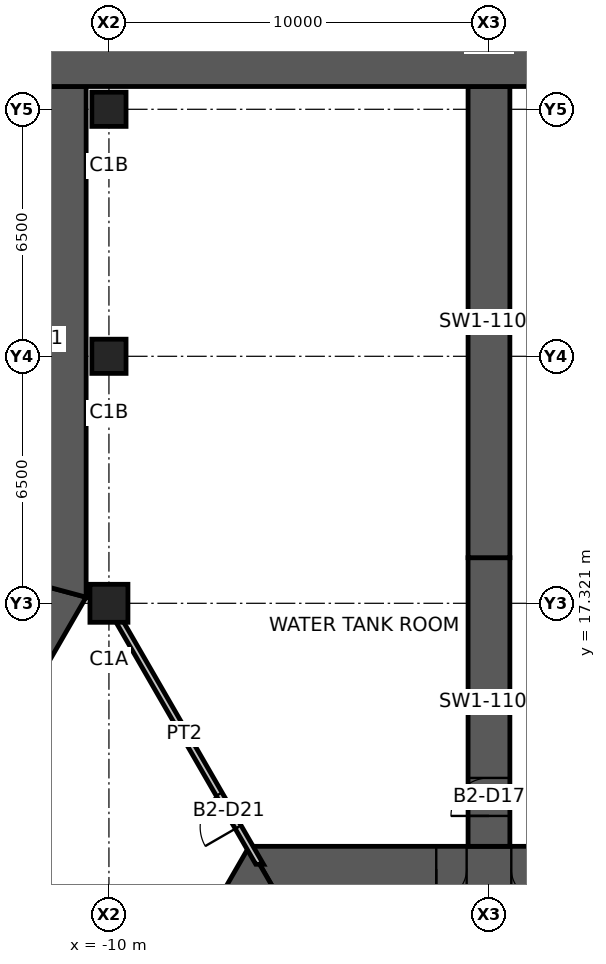
"""IFC4 building model, lengths in metres.
Left out: names, types, materials, properties, quantities, classifications, styles, units other than length and angle.
Written with IfcOpenShell. Run it as: python <this file> out.ifc"""

import sys

from ifc_helpers import new_model, si_unit, direction, frame, frame_2d, origin, origin_2d, place, context, subcontext, project, spatial, polyline, rectangle, hollow_rectangle, outline, extrude, element, fill, save


model = new_model("IFC4")
c1 = context("Model", 3, precision=1e-05, world=origin(), true_north=direction((0.0, 1.0)))
c2 = subcontext(c1, "Body", "Model", "MODEL_VIEW")
j1 = project(units=[si_unit("LENGTHUNIT", "METRE"), si_unit("PLANEANGLEUNIT", "RADIAN")], contexts=[c1])
p1 = place(None, origin())
s1 = spatial("IfcSite", under=j1, at=p1, CompositionType="ELEMENT")
p2 = place(p1, origin())
s2 = spatial("IfcBuilding", under=s1, at=p2, CompositionType="ELEMENT")
p3 = place(p2, frame((0.0, 0.0, -10.0)))
s3 = spatial("IfcBuildingStorey", under=s2, at=p3, CompositionType="ELEMENT", Elevation=-10.0)
p4 = place(p3, frame((-10.0, 17.321, -1.2), z_axis=(0.0, 0.0, 1.0), x_axis=(1.0, 0.0, 0.0)))
e1 = element("IfcColumn", 1, at=p4, inside=s3, PredefinedType="COLUMN", context=c2, shape_type="SweptSolid", body=[
    extrude(hollow_rectangle(XDim=1.0, YDim=1.0, WallThickness=0.06, at=origin_2d()), origin(), (0.0, 0.0, 1.0), 6.2),
])
for number, where, z_axis, x_axis in (
    (2, (-10.0, 23.821, -1.2), (0.0, 0.0, 1.0), (1.0, 0.0, 0.0)),
    (3, (-10.0, 30.321, -1.2), (0.0, 0.0, 1.0), (1.0, 0.0, 0.0)),
):
    element("IfcColumn", number, at=place(p3, frame(where, z_axis=z_axis, x_axis=x_axis)), inside=s3, PredefinedType="COLUMN", context=c2, shape_type="SweptSolid", body=[
        extrude(hollow_rectangle(XDim=0.9, YDim=0.9, WallThickness=0.05, at=origin_2d()), origin(), (0.0, 0.0, 1.0), 6.2),
    ])
p5 = place(p3, frame((5.961, 10.325, 0.0), z_axis=(0.0, 0.0, 1.0), x_axis=(-1.0, 0.0, 0.0)))
e4 = element("IfcWall", 4, at=p5, inside=s3, PredefinedType="SHEAR", context=c2, shape_type="SweptSolid", body=[
    extrude(outline(polyline([(-0.346, -0.6), (4.574, -0.6), (5.374, -0.6), (6.549, -0.6), (7.349, -0.6), (12.269, -0.6), (11.576, 0.6), (7.349, 0.6), (6.549, 0.6), (5.374, 0.6), (4.574, 0.6), (0.346, 0.6), (-0.346, -0.6)])), origin(), (0.0, 0.0, 1.0), 5.0),
])
p6 = place(p5, frame((6.549, 0.0, 0.0)))
e5 = element("IfcOpeningElement", 5, at=p6, cuts=e4, PredefinedType="OPENING", context=c2, shape_type="SweptSolid", body=[
    extrude(rectangle(XDim=0.8, YDim=2.1, at=frame_2d((0.4, 1.05))), frame((0.0, 0.61, 0.0), z_axis=(0.0, -1.0, 0.0), x_axis=(1.0, 0.0, 0.0)), (0.0, 0.0, 1.0), 1.22),
])
p7 = place(p5, frame((4.574, 0.0, 0.0)))
e6 = element("IfcOpeningElement", 6, at=p7, cuts=e4, PredefinedType="OPENING", context=c2, shape_type="SweptSolid", body=[
    extrude(rectangle(XDim=0.8, YDim=2.1, at=frame_2d((0.4, 1.05))), frame((0.0, 0.61, 0.0), z_axis=(0.0, -1.0, 0.0), x_axis=(1.0, 0.0, 0.0)), (0.0, 0.0, 1.0), 1.22),
])
p8 = place(p3, frame((-5.961, 10.325, 0.0), z_axis=(0.0, 0.0, 1.0), x_axis=(-0.500004296715, -0.866022923061, 0.0)))
e7 = element("IfcWall", 7, at=p8, inside=s3, PredefinedType="SHEAR", context=c2, shape_type="SweptSolid", body=[
    extrude(outline(polyline([(-0.346, -0.6), (4.494, -0.6), (5.494, -0.6), (12.269, -0.6), (11.576, 0.6), (5.494, 0.6), (4.494, 0.6), (0.346, 0.6), (-0.346, -0.6)])), origin(), (0.0, 0.0, 1.0), 5.0),
])
p9 = place(p8, frame((4.494, 0.0, 0.0)))
e8 = element("IfcOpeningElement", 8, at=p9, cuts=e7, PredefinedType="OPENING", context=c2, shape_type="SweptSolid", body=[
    extrude(rectangle(XDim=1.0, YDim=2.1, at=frame_2d((0.5, 1.05))), frame((0.0, 0.61, 0.0), z_axis=(0.0, -1.0, 0.0), x_axis=(1.0, 0.0, 0.0)), (0.0, 0.0, 1.0), 1.22),
])
p10 = place(p3, frame((0.0, 10.925, 0.0), z_axis=(0.0, 0.0, 1.0), x_axis=(0.0, 1.0, 0.0)))
e9 = element("IfcWall", 9, at=p10, inside=s3, PredefinedType="SHEAR", context=c2, shape_type="SweptSolid", body=[
    extrude(rectangle(XDim=7.595, YDim=1.1, at=frame_2d((3.798, 0.0))), origin(), (0.0, 0.0, 1.0), 5.0),
])
p11 = place(p10, frame((0.8, 0.0, 0.0)))
e10 = element("IfcOpeningElement", 10, at=p11, cuts=e9, PredefinedType="OPENING", context=c2, shape_type="SweptSolid", body=[
    extrude(rectangle(XDim=1.0, YDim=2.1, at=frame_2d((0.5, 1.05))), frame((0.0, 0.56, 0.0), z_axis=(0.0, -1.0, 0.0), x_axis=(1.0, 0.0, 0.0)), (0.0, 0.0, 1.0), 1.12),
])
p12 = place(p3, frame((0.0, 18.521, 0.0), z_axis=(0.0, 0.0, 1.0), x_axis=(0.0, 1.0, 0.0)))
e11 = element("IfcWall", 11, at=p12, inside=s3, PredefinedType="SHEAR", context=c2, shape_type="SweptSolid", body=[
    extrude(rectangle(XDim=12.4, YDim=1.1, at=frame_2d((6.2, 0.0))), origin(), (0.0, 0.0, 1.0), 5.0),
])
p13 = place(p3, frame((-20.878, 0.878, 0.0), z_axis=(0.0, 0.0, 1.0), x_axis=(0.499998307868, 0.866026380735, 0.0)))
e12 = element("IfcWall", 12, at=p13, inside=s3, PredefinedType="SOLIDWALL", context=c2, shape_type="SweptSolid", body=[
    extrude(outline(polyline([(-0.161, -0.6), (19.518, -0.6), (19.196, 0.6), (0.161, 0.6), (-0.161, -0.6)])), origin(), (0.0, 0.0, 1.0), 5.0),
])
p14 = place(p3, frame((-11.2, 17.642, 0.0), z_axis=(0.0, 0.0, 1.0), x_axis=(0.0, 1.0, 0.0)))
e13 = element("IfcWall", 13, at=p14, inside=s3, PredefinedType="SOLIDWALL", context=c2, shape_type="SweptSolid", body=[
    extrude(outline(polyline([(-0.161, -0.6), (13.278, -0.6), (13.278, 0.6), (0.161, 0.6), (-0.161, -0.6)])), origin(), (0.0, 0.0, 1.0), 5.0),
])
p15 = place(p3, frame((-11.8, 31.521, 0.0), z_axis=(0.0, 0.0, 1.0), x_axis=(1.0, 0.0, 0.0)))
e14 = element("IfcWall", 14, at=p15, inside=s3, PredefinedType="SOLIDWALL", context=c2, shape_type="SweptSolid", body=[
    extrude(rectangle(XDim=23.6, YDim=1.2, at=frame_2d((11.8, 0.0))), origin(), (0.0, 0.0, 1.0), 5.0),
])
p16 = place(p3, frame((-6.035, 10.453, 0.0), z_axis=(0.0, 0.0, 1.0), x_axis=(-0.499993402427, 0.866029212861, 0.0)))
e15 = element("IfcWall", 15, at=p16, inside=s3, PredefinedType="PARTITIONING", context=c2, shape_type="SweptSolid", body=[
    extrude(outline(polyline([(-0.051, -0.087), (1.129, -0.087), (2.129, -0.087), (7.93, -0.087), (7.93, 0.087), (2.129, 0.087), (1.129, 0.087), (0.051, 0.087), (-0.051, -0.087)])), origin(), (0.0, 0.0, 1.0), 3.85),
])
p17 = place(p16, frame((1.129, 0.0, 0.0)))
e16 = element("IfcOpeningElement", 16, at=p17, cuts=e15, PredefinedType="OPENING", context=c2, shape_type="SweptSolid", body=[
    extrude(rectangle(XDim=1.0, YDim=2.1, at=frame_2d((0.5, 1.05))), frame((0.0, 0.098, 0.0), z_axis=(0.0, -1.0, 0.0), x_axis=(1.0, 0.0, 0.0)), (0.0, 0.0, 1.0), 0.195),
])
p18 = place(p6, origin())
e17 = element("IfcDoor", 17, at=p18, inside=s3, OperationType="SINGLE_SWING_RIGHT", PredefinedType="DOOR", context=c2, shape_type="SweptSolid", body=[
    extrude(rectangle(XDim=0.8, YDim=2.1, at=frame_2d((0.4, 1.05))), frame((0.0, 0.025, 0.0), z_axis=(0.0, -1.0, 0.0), x_axis=(1.0, 0.0, 0.0)), (0.0, 0.0, 1.0), 0.05),
])
fill(e5, e17)
p19 = place(p7, origin())
e18 = element("IfcDoor", 18, at=p19, inside=s3, OperationType="SINGLE_SWING_LEFT", PredefinedType="DOOR", context=c2, shape_type="SweptSolid", body=[
    extrude(rectangle(XDim=0.8, YDim=2.1, at=frame_2d((0.4, 1.05))), frame((0.0, 0.025, 0.0), z_axis=(0.0, -1.0, 0.0), x_axis=(1.0, 0.0, 0.0)), (0.0, 0.0, 1.0), 0.05),
])
fill(e6, e18)
p20 = place(p11, origin())
e19 = element("IfcDoor", 19, at=p20, inside=s3, OperationType="SINGLE_SWING_LEFT", PredefinedType="DOOR", context=c2, shape_type="SweptSolid", body=[
    extrude(rectangle(XDim=1.0, YDim=2.1, at=frame_2d((0.5, 1.05))), frame((0.0, 0.025, 0.0), z_axis=(0.0, -1.0, 0.0), x_axis=(1.0, 0.0, 0.0)), (0.0, 0.0, 1.0), 0.05),
])
fill(e10, e19)
p21 = place(p17, origin())
e20 = element("IfcDoor", 20, at=p21, inside=s3, OperationType="SINGLE_SWING_LEFT", PredefinedType="DOOR", context=c2, shape_type="SweptSolid", body=[
    extrude(rectangle(XDim=1.0, YDim=2.1, at=frame_2d((0.5, 1.05))), frame((0.0, 0.025, 0.0), z_axis=(0.0, -1.0, 0.0), x_axis=(1.0, 0.0, 0.0)), (0.0, 0.0, 1.0), 0.05),
])
fill(e16, e20)
save(model, sys.argv[1])
